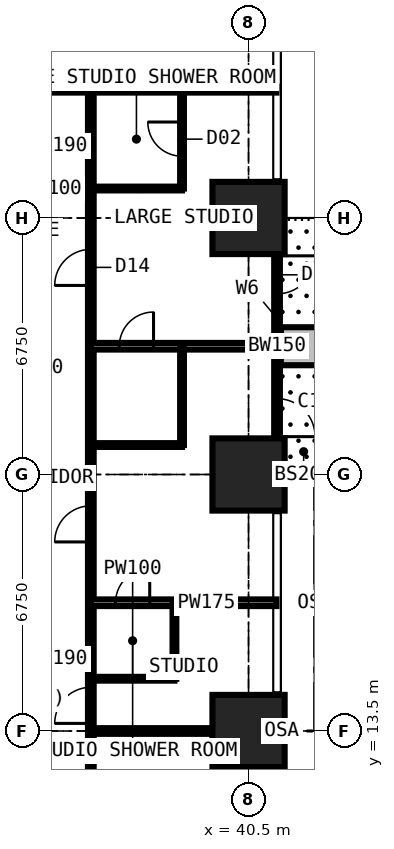
"""IFC4 building model, lengths in metres.
Left out: names, types, materials, properties, quantities, classifications, styles, units other than length and angle.
Written with IfcOpenShell. Run it as: python <this file> out.ifc"""

import sys

from ifc_helpers import new_model, si_unit, direction, frame, frame_2d, origin, origin_2d, place, context, subcontext, project, spatial, rectangle, extrude, element, fill, save


model = new_model("IFC4")
c1 = context("Model", 3, precision=1e-05, world=origin(), true_north=direction((0.0, 1.0)))
c2 = subcontext(c1, "Body", "Model", "MODEL_VIEW")
j1 = project(units=[si_unit("LENGTHUNIT", "METRE"), si_unit("PLANEANGLEUNIT", "RADIAN")], contexts=[c1])
p1 = place(None, origin())
s1 = spatial("IfcSite", under=j1, at=p1, CompositionType="ELEMENT")
p2 = place(p1, origin())
s2 = spatial("IfcBuilding", under=s1, at=p2, CompositionType="ELEMENT")
p3 = place(p2, frame((0.0, 0.0, 28.8)))
s3 = spatial("IfcBuildingStorey", under=s2, at=p3, CompositionType="ELEMENT", Elevation=28.8)
for number, where, z_axis, x_axis in (
    (1, (40.5, 13.5, 0.0), (0.0, 0.0, 1.0), (1.0, 0.0, 0.0)),
    (2, (40.5, 20.25, 0.0), (0.0, 0.0, 1.0), (1.0, 0.0, 0.0)),
    (3, (40.5, 27.0, 0.0), (0.0, 0.0, 1.0), (1.0, 0.0, 0.0)),
):
    element("IfcColumn", number, at=place(p3, frame(where, z_axis=z_axis, x_axis=x_axis)), inside=s3, PredefinedType="COLUMN", context=c2, shape_type="SweptSolid", body=[
        extrude(rectangle(XDim=1.9, YDim=1.9, at=origin_2d()), origin(), (0.0, 0.0, 1.0), 3.6),
    ])
p4 = place(p3, frame((41.25, 27.0, 0.0), z_axis=(0.0, 0.0, 1.0), x_axis=(0.0, -1.0, 0.0)))
e4 = element("IfcWall", 4, at=p4, inside=s3, PredefinedType="SOLIDWALL", context=c2, shape_type="SweptSolid", body=[
    extrude(rectangle(XDim=6.75, YDim=0.15, at=frame_2d((3.375, 0.0))), origin(), (0.0, 0.0, 1.0), 3.375),
])
p5 = place(p4, frame((0.996, 0.0, 0.0)))
e5 = element("IfcOpeningElement", 5, at=p5, cuts=e4, PredefinedType="OPENING", context=c2, shape_type="SweptSolid", body=[
    extrude(rectangle(XDim=1.0, YDim=2.2, at=frame_2d((0.5, 1.1))), frame((0.0, 0.085, 0.0), z_axis=(0.0, -1.0, 0.0), x_axis=(1.0, 0.0, 0.0)), (0.0, 0.0, 1.0), 0.17),
])
p6 = place(p4, frame((2.042, 0.0, 0.9)))
e6 = element("IfcOpeningElement", 6, at=p6, cuts=e4, PredefinedType="OPENING", context=c2, shape_type="SweptSolid", body=[
    extrude(rectangle(XDim=1.2, YDim=1.8, at=frame_2d((0.6, 0.9))), frame((0.0, 0.085, 0.0), z_axis=(0.0, -1.0, 0.0), x_axis=(1.0, 0.0, 0.0)), (0.0, 0.0, 1.0), 0.17),
])
p7 = place(p4, frame((4.754, 0.0, 0.0)))
e7 = element("IfcOpeningElement", 7, at=p7, cuts=e4, PredefinedType="OPENING", context=c2, shape_type="SweptSolid", body=[
    extrude(rectangle(XDim=1.0, YDim=2.2, at=frame_2d((0.5, 1.1))), frame((0.0, 0.085, 0.0), z_axis=(0.0, -1.0, 0.0), x_axis=(1.0, 0.0, 0.0)), (0.0, 0.0, 1.0), 0.17),
])
p8 = place(p4, frame((3.508, 0.0, 0.9)))
e8 = element("IfcOpeningElement", 8, at=p8, cuts=e4, PredefinedType="OPENING", context=c2, shape_type="SweptSolid", body=[
    extrude(rectangle(XDim=1.2, YDim=1.8, at=frame_2d((0.6, 0.9))), frame((0.0, 0.085, 0.0), z_axis=(0.0, -1.0, 0.0), x_axis=(1.0, 0.0, 0.0)), (0.0, 0.0, 1.0), 0.17),
])
p9 = place(p3, frame((41.35, 23.625, 0.0), z_axis=(0.0, 0.0, 1.0), x_axis=(1.0, 0.0, 0.0)))
e9 = element("IfcWall", 9, at=p9, inside=s3, PredefinedType="USERDEFINED", context=c2, shape_type="SweptSolid", body=[
    extrude(rectangle(XDim=2.2, YDim=1.0, at=frame_2d((1.1, 0.0))), origin(), (0.0, 0.0, 1.0), 0.9),
])
p10 = place(p3, frame((30.375, 30.375, 0.0), z_axis=(0.0, 0.0, 1.0), x_axis=(1.0, 0.0, 0.0)))
e10 = element("IfcWall", 10, at=p10, inside=s3, PredefinedType="PARTITIONING", context=c2, shape_type="SweptSolid", body=[
    extrude(rectangle(XDim=10.859, YDim=0.15, at=frame_2d((5.429, 0.0))), origin(), (0.0, 0.0, 1.0), 3.375),
])
p11 = place(p3, frame((36.35, 6.75, 0.0), z_axis=(0.0, 0.0, 1.0), x_axis=(0.0, 1.0, 0.0)))
e11 = element("IfcWall", 11, at=p11, inside=s3, PredefinedType="PARTITIONING", context=c2, shape_type="SweptSolid", body=[
    extrude(rectangle(XDim=23.625, YDim=0.15, at=frame_2d((11.812, 0.0))), origin(), (0.0, 0.0, 1.0), 3.375),
])
p12 = place(p11, frame((18.475, 0.0, 0.0)))
e12 = element("IfcOpeningElement", 12, at=p12, cuts=e11, PredefinedType="OPENING", context=c2, shape_type="SweptSolid", body=[
    extrude(rectangle(XDim=0.95, YDim=2.2, at=frame_2d((0.475, 1.1))), frame((0.0, 0.085, 0.0), z_axis=(0.0, -1.0, 0.0), x_axis=(1.0, 0.0, 0.0)), (0.0, 0.0, 1.0), 0.17),
])
p13 = place(p11, frame((11.725, 0.0, 0.0)))
e13 = element("IfcOpeningElement", 13, at=p13, cuts=e11, PredefinedType="OPENING", context=c2, shape_type="SweptSolid", body=[
    extrude(rectangle(XDim=0.95, YDim=2.2, at=frame_2d((0.475, 1.1))), frame((0.0, 0.085, 0.0), z_axis=(0.0, -1.0, 0.0), x_axis=(1.0, 0.0, 0.0)), (0.0, 0.0, 1.0), 0.17),
])
p14 = place(p11, frame((6.95, 0.0, 0.0)))
e14 = element("IfcOpeningElement", 14, at=p14, cuts=e11, PredefinedType="OPENING", context=c2, shape_type="SweptSolid", body=[
    extrude(rectangle(XDim=0.95, YDim=2.2, at=frame_2d((0.475, 1.1))), frame((0.0, 0.085, 0.0), z_axis=(0.0, -1.0, 0.0), x_axis=(1.0, 0.0, 0.0)), (0.0, 0.0, 1.0), 0.17),
])
p15 = place(p3, frame((36.35, 13.5, 0.0), z_axis=(0.0, 0.0, 1.0), x_axis=(1.0, 0.0, 0.0)))
e15 = element("IfcWall", 15, at=p15, inside=s3, PredefinedType="PARTITIONING", context=c2, shape_type="SweptSolid", body=[
    extrude(rectangle(XDim=4.884, YDim=0.15, at=frame_2d((2.442, 0.0))), origin(), (0.0, 0.0, 1.0), 2.61),
])
p16 = place(p3, frame((36.35, 14.875, 0.0), z_axis=(0.0, 0.0, 1.0), x_axis=(1.0, 0.0, 0.0)))
e16 = element("IfcWall", 16, at=p16, inside=s3, PredefinedType="PARTITIONING", context=c2, shape_type="SweptSolid", body=[
    extrude(rectangle(XDim=2.2, YDim=0.1, at=frame_2d((1.1, 0.0))), origin(), (0.0, 0.0, 1.0), 3.375),
])
p17 = place(p3, frame((36.35, 16.875, 0.0), z_axis=(0.0, 0.0, 1.0), x_axis=(1.0, 0.0, 0.0)))
e17 = element("IfcWall", 17, at=p17, inside=s3, PredefinedType="PARTITIONING", context=c2, shape_type="SweptSolid", body=[
    extrude(rectangle(XDim=4.884, YDim=0.175, at=frame_2d((2.442, 0.0))), origin(), (0.0, 0.0, 1.0), 3.375),
])
p18 = place(p17, frame((0.65, 0.0, 0.0)))
e18 = element("IfcOpeningElement", 18, at=p18, cuts=e17, PredefinedType="OPENING", context=c2, shape_type="SweptSolid", body=[
    extrude(rectangle(XDim=0.9, YDim=2.2, at=frame_2d((0.45, 1.1))), frame((0.0, 0.097, 0.0), z_axis=(0.0, -1.0, 0.0), x_axis=(1.0, 0.0, 0.0)), (0.0, 0.0, 1.0), 0.195),
])
p19 = place(p3, frame((36.35, 21.025, 0.0), z_axis=(0.0, 0.0, 1.0), x_axis=(1.0, 0.0, 0.0)))
e19 = element("IfcWall", 19, at=p19, inside=s3, PredefinedType="PARTITIONING", context=c2, shape_type="SweptSolid", body=[
    extrude(rectangle(XDim=2.4, YDim=0.1, at=frame_2d((1.2, 0.0))), origin(), (0.0, 0.0, 1.0), 3.375),
])
p20 = place(p3, frame((36.35, 23.625, 0.0), z_axis=(0.0, 0.0, 1.0), x_axis=(1.0, 0.0, 0.0)))
e20 = element("IfcWall", 20, at=p20, inside=s3, PredefinedType="PARTITIONING", context=c2, shape_type="SweptSolid", body=[
    extrude(rectangle(XDim=4.884, YDim=0.175, at=frame_2d((2.442, 0.0))), origin(), (0.0, 0.0, 1.0), 3.375),
])
p21 = place(p20, frame((0.75, 0.0, 0.0)))
e21 = element("IfcOpeningElement", 21, at=p21, cuts=e20, PredefinedType="OPENING", context=c2, shape_type="SweptSolid", body=[
    extrude(rectangle(XDim=0.9, YDim=2.2, at=frame_2d((0.45, 1.1))), frame((0.0, 0.097, 0.0), z_axis=(0.0, -1.0, 0.0), x_axis=(1.0, 0.0, 0.0)), (0.0, 0.0, 1.0), 0.195),
])
p22 = place(p3, frame((36.35, 27.775, 0.0), z_axis=(0.0, 0.0, 1.0), x_axis=(1.0, 0.0, 0.0)))
e22 = element("IfcWall", 22, at=p22, inside=s3, PredefinedType="PARTITIONING", context=c2, shape_type="SweptSolid", body=[
    extrude(rectangle(XDim=2.4, YDim=0.1, at=frame_2d((1.2, 0.0))), origin(), (0.0, 0.0, 1.0), 3.375),
])
p23 = place(p3, frame((38.55, 14.875, 0.0), z_axis=(0.0, 0.0, 1.0), x_axis=(0.0, 1.0, 0.0)))
e23 = element("IfcWall", 23, at=p23, inside=s3, PredefinedType="PARTITIONING", context=c2, shape_type="SweptSolid", body=[
    extrude(rectangle(XDim=2.0, YDim=0.1, at=frame_2d((1.0, 0.0))), origin(), (0.0, 0.0, 1.0), 3.375),
])
p24 = place(p3, frame((38.75, 21.025, 0.0), z_axis=(0.0, 0.0, 1.0), x_axis=(0.0, 1.0, 0.0)))
e24 = element("IfcWall", 24, at=p24, inside=s3, PredefinedType="PARTITIONING", context=c2, shape_type="SweptSolid", body=[
    extrude(rectangle(XDim=2.6, YDim=0.1, at=frame_2d((1.3, 0.0))), origin(), (0.0, 0.0, 1.0), 3.375),
])
p25 = place(p3, frame((38.75, 27.775, 0.0), z_axis=(0.0, 0.0, 1.0), x_axis=(0.0, 1.0, 0.0)))
e25 = element("IfcWall", 25, at=p25, inside=s3, PredefinedType="PARTITIONING", context=c2, shape_type="SweptSolid", body=[
    extrude(rectangle(XDim=2.6, YDim=0.1, at=frame_2d((1.3, 0.0))), origin(), (0.0, 0.0, 1.0), 3.375),
])
p26 = place(p25, frame((0.85, 0.0, 0.0)))
e26 = element("IfcOpeningElement", 26, at=p26, cuts=e25, PredefinedType="OPENING", context=c2, shape_type="SweptSolid", body=[
    extrude(rectangle(XDim=0.9, YDim=2.2, at=frame_2d((0.45, 1.1))), frame((0.0, 0.06, 0.0), z_axis=(0.0, -1.0, 0.0), x_axis=(1.0, 0.0, 0.0)), (0.0, 0.0, 1.0), 0.12),
])
p27 = place(p5, origin())
e27 = element("IfcDoor", 27, at=p27, inside=s3, OperationType="SINGLE_SWING_LEFT", PredefinedType="DOOR", context=c2, shape_type="SweptSolid", body=[
    extrude(rectangle(XDim=1.0, YDim=2.2, at=frame_2d((0.5, 1.1))), frame((0.0, 0.025, 0.0), z_axis=(0.0, -1.0, 0.0), x_axis=(1.0, 0.0, 0.0)), (0.0, 0.0, 1.0), 0.05),
])
fill(e5, e27)
p28 = place(p6, origin())
e28 = element("IfcWindow", 28, at=p28, inside=s3, PartitioningType="SINGLE_PANEL", PredefinedType="WINDOW", context=c2, shape_type="SweptSolid", body=[
    extrude(rectangle(XDim=1.2, YDim=1.8, at=frame_2d((0.6, 0.9))), frame((0.0, 0.03, 0.0), z_axis=(0.0, -1.0, 0.0), x_axis=(1.0, 0.0, 0.0)), (0.0, 0.0, 1.0), 0.06),
])
fill(e6, e28)
p29 = place(p7, origin())
e29 = element("IfcDoor", 29, at=p29, inside=s3, OperationType="SINGLE_SWING_RIGHT", PredefinedType="DOOR", context=c2, shape_type="SweptSolid", body=[
    extrude(rectangle(XDim=1.0, YDim=2.2, at=frame_2d((0.5, 1.1))), frame((0.0, 0.025, 0.0), z_axis=(0.0, -1.0, 0.0), x_axis=(1.0, 0.0, 0.0)), (0.0, 0.0, 1.0), 0.05),
])
fill(e7, e29)
p30 = place(p8, origin())
e30 = element("IfcWindow", 30, at=p30, inside=s3, PartitioningType="SINGLE_PANEL", PredefinedType="WINDOW", context=c2, shape_type="SweptSolid", body=[
    extrude(rectangle(XDim=1.2, YDim=1.8, at=frame_2d((0.6, 0.9))), frame((0.0, 0.03, 0.0), z_axis=(0.0, -1.0, 0.0), x_axis=(1.0, 0.0, 0.0)), (0.0, 0.0, 1.0), 0.06),
])
fill(e8, e30)
p31 = place(p12, origin())
e31 = element("IfcDoor", 31, at=p31, inside=s3, OperationType="SINGLE_SWING_LEFT", PredefinedType="DOOR", context=c2, shape_type="SweptSolid", body=[
    extrude(rectangle(XDim=0.95, YDim=2.2, at=frame_2d((0.475, 1.1))), frame((0.0, 0.025, 0.0), z_axis=(0.0, -1.0, 0.0), x_axis=(1.0, 0.0, 0.0)), (0.0, 0.0, 1.0), 0.05),
])
fill(e12, e31)
p32 = place(p26, origin())
e32 = element("IfcDoor", 32, at=p32, inside=s3, OperationType="SINGLE_SWING_RIGHT", PredefinedType="DOOR", context=c2, shape_type="SweptSolid", body=[
    extrude(rectangle(XDim=0.9, YDim=2.2, at=frame_2d((0.45, 1.1))), frame((0.0, 0.025, 0.0), z_axis=(0.0, -1.0, 0.0), x_axis=(1.0, 0.0, 0.0)), (0.0, 0.0, 1.0), 0.05),
])
fill(e26, e32)
p33 = place(p13, origin())
e33 = element("IfcDoor", 33, at=p33, inside=s3, OperationType="SINGLE_SWING_LEFT", PredefinedType="DOOR", context=c2, shape_type="SweptSolid", body=[
    extrude(rectangle(XDim=0.95, YDim=2.2, at=frame_2d((0.475, 1.1))), frame((0.0, 0.025, 0.0), z_axis=(0.0, -1.0, 0.0), x_axis=(1.0, 0.0, 0.0)), (0.0, 0.0, 1.0), 0.05),
])
fill(e13, e33)
p34 = place(p21, origin())
e34 = element("IfcDoor", 34, at=p34, inside=s3, OperationType="SINGLE_SWING_RIGHT", PredefinedType="DOOR", context=c2, shape_type="SweptSolid", body=[
    extrude(rectangle(XDim=0.9, YDim=2.2, at=frame_2d((0.45, 1.1))), frame((0.0, 0.025, 0.0), z_axis=(0.0, -1.0, 0.0), x_axis=(1.0, 0.0, 0.0)), (0.0, 0.0, 1.0), 0.05),
])
fill(e21, e34)
p35 = place(p14, origin())
e35 = element("IfcDoor", 35, at=p35, inside=s3, OperationType="SINGLE_SWING_LEFT", PredefinedType="DOOR", context=c2, shape_type="SweptSolid", body=[
    extrude(rectangle(XDim=0.95, YDim=2.2, at=frame_2d((0.475, 1.1))), frame((0.0, 0.025, 0.0), z_axis=(0.0, -1.0, 0.0), x_axis=(1.0, 0.0, 0.0)), (0.0, 0.0, 1.0), 0.05),
])
fill(e14, e35)
p36 = place(p18, origin())
e36 = element("IfcDoor", 36, at=p36, inside=s3, OperationType="SINGLE_SWING_RIGHT", PredefinedType="DOOR", context=c2, shape_type="SweptSolid", body=[
    extrude(rectangle(XDim=0.9, YDim=2.2, at=frame_2d((0.45, 1.1))), frame((0.0, 0.025, 0.0), z_axis=(0.0, -1.0, 0.0), x_axis=(1.0, 0.0, 0.0)), (0.0, 0.0, 1.0), 0.05),
])
fill(e18, e36)
save(model, sys.argv[1])
